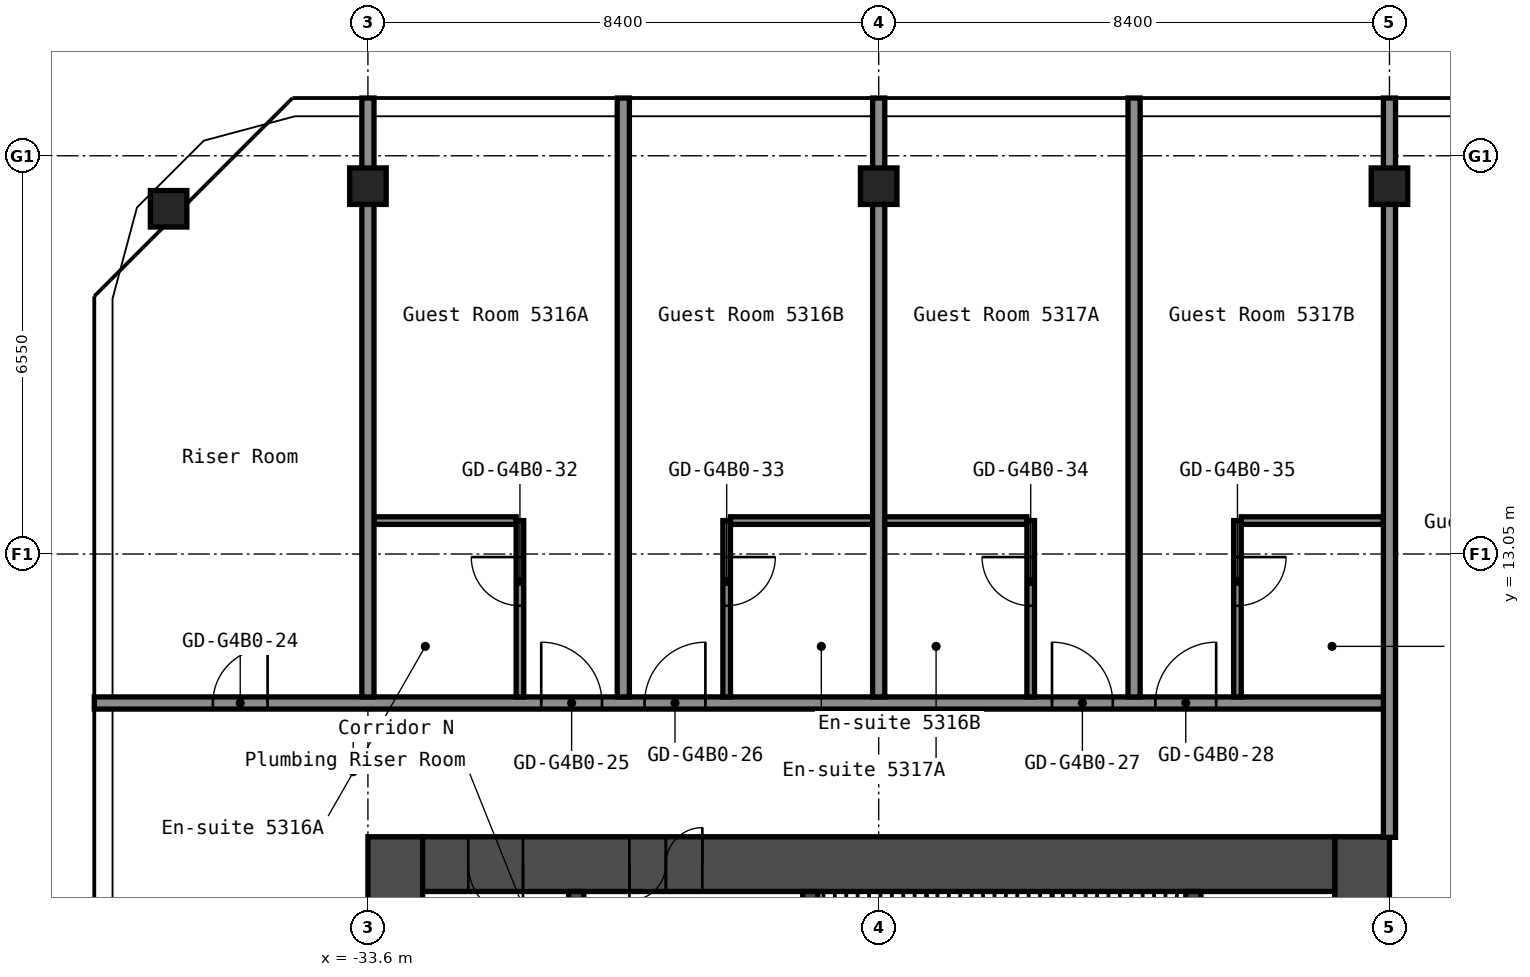
"""IFC4 building model, lengths in metres.
Left out: names, types, materials, properties, quantities, classifications, styles, units other than length and angle.
Written with IfcOpenShell. Run it as: python <this file> out.ifc"""

import sys

from ifc_helpers import new_model, si_unit, direction, frame, frame_2d, origin, origin_2d, place, context, subcontext, project, spatial, rectangle, hollow_rectangle, extrude, element, fill, save


model = new_model("IFC4")
c1 = context("Model", 3, precision=1e-05, world=origin(), true_north=direction((0.0, 1.0)))
c2 = subcontext(c1, "Body", "Model", "MODEL_VIEW")
j1 = project(units=[si_unit("LENGTHUNIT", "METRE"), si_unit("PLANEANGLEUNIT", "RADIAN")], contexts=[c1])
p1 = place(None, origin())
s1 = spatial("IfcSite", under=j1, at=p1, CompositionType="ELEMENT")
p2 = place(p1, origin())
s2 = spatial("IfcBuilding", under=s1, at=p2, CompositionType="ELEMENT")
p3 = place(p2, frame((0.0, 0.0, 189.8)))
s3 = spatial("IfcBuildingStorey", under=s2, at=p3, CompositionType="ELEMENT", Elevation=189.8)
for number, where, z_axis, x_axis in (
    (1, (-36.878, 18.729, 0.0), (0.0, 0.0, 1.0), (1.0, 0.0, 0.0)),
    (2, (-33.6, 19.1, 0.0), (0.0, 0.0, 1.0), (1.0, 0.0, 0.0)),
    (3, (-25.2, 19.1, 0.0), (0.0, 0.0, 1.0), (1.0, 0.0, 0.0)),
    (4, (-16.8, 19.1, 0.0), (0.0, 0.0, 1.0), (1.0, 0.0, 0.0)),
):
    element("IfcColumn", number, at=place(p3, frame(where, z_axis=z_axis, x_axis=x_axis)), inside=s3, PredefinedType="COLUMN", context=c2, shape_type="SweptSolid", body=[
        extrude(hollow_rectangle(XDim=0.6, YDim=0.6, WallThickness=0.025, InnerFilletRadius=0.038, OuterFilletRadius=0.062, at=origin_2d()), origin(), (0.0, 0.0, 1.0), 2.75),
    ])
p4 = place(p3, frame((-17.25, -8.4, 0.0), z_axis=(0.0, 0.0, 1.0), x_axis=(0.0, 1.0, 0.0)))
e5 = element("IfcWall", 5, at=p4, inside=s3, PredefinedType="SHEAR", context=c2, shape_type="SweptSolid", body=[
    extrude(rectangle(XDim=16.8, YDim=0.9, at=frame_2d((8.4, 0.0))), origin(), (0.0, 0.0, 1.0), 2.75),
])
p5 = place(p4, frame((10.1, 0.0, 0.0)))
e6 = element("IfcOpeningElement", 6, at=p5, cuts=e5, PredefinedType="OPENING", context=c2, shape_type="SweptSolid", body=[
    extrude(rectangle(XDim=1.6, YDim=2.1, at=frame_2d((0.8, 1.05))), frame((0.0, 0.46, 0.0), z_axis=(0.0, -1.0, 0.0), x_axis=(1.0, 0.0, 0.0)), (0.0, 0.0, 1.0), 0.92),
])
p6 = place(p3, frame((-33.15, -8.4, 0.0), z_axis=(0.0, 0.0, 1.0), x_axis=(0.0, 1.0, 0.0)))
e7 = element("IfcWall", 7, at=p6, inside=s3, PredefinedType="SHEAR", context=c2, shape_type="SweptSolid", body=[
    extrude(rectangle(XDim=16.8, YDim=0.9, at=frame_2d((8.4, 0.0))), origin(), (0.0, 0.0, 1.0), 2.75),
])
p7 = place(p3, frame((-32.7, 7.95, 0.0), z_axis=(0.0, 0.0, 1.0), x_axis=(1.0, 0.0, 0.0)))
e8 = element("IfcWall", 8, at=p7, inside=s3, PredefinedType="SHEAR", context=c2, shape_type="SweptSolid", body=[
    extrude(rectangle(XDim=15.0, YDim=0.9, at=frame_2d((7.5, 0.0))), origin(), (0.0, 0.0, 1.0), 2.75),
])
p8 = place(p7, frame((3.4, 0.0, 0.0)))
e9 = element("IfcOpeningElement", 9, at=p8, cuts=e8, PredefinedType="OPENING", context=c2, shape_type="SweptSolid", body=[
    extrude(rectangle(XDim=1.2, YDim=2.1, at=frame_2d((0.6, 1.05))), frame((0.0, 0.46, 0.0), z_axis=(0.0, -1.0, 0.0), x_axis=(1.0, 0.0, 0.0)), (0.0, 0.0, 1.0), 0.92),
])
p9 = place(p7, frame((0.75, 0.0, 0.0)))
e10 = element("IfcOpeningElement", 10, at=p9, cuts=e8, PredefinedType="OPENING", context=c2, shape_type="SweptSolid", body=[
    extrude(rectangle(XDim=0.9, YDim=2.1, at=frame_2d((0.45, 1.05))), frame((0.0, 0.46, 0.0), z_axis=(0.0, -1.0, 0.0), x_axis=(1.0, 0.0, 0.0)), (0.0, 0.0, 1.0), 0.92),
])
p10 = place(p3, frame((-20.025, 1.2, 0.0), z_axis=(0.0, 0.0, 1.0), x_axis=(0.0, 1.0, 0.0)))
e11 = element("IfcWall", 11, at=p10, inside=s3, PredefinedType="SHEAR", context=c2, shape_type="SweptSolid", body=[
    extrude(rectangle(XDim=6.3, YDim=0.25, at=frame_2d((3.15, 0.0))), origin(), (0.0, 0.0, 1.0), 2.75),
])
p11 = place(p3, frame((-26.325, 3.75, 0.0), z_axis=(0.0, 0.0, 1.0), x_axis=(0.0, 1.0, 0.0)))
e12 = element("IfcWall", 12, at=p11, inside=s3, PredefinedType="SHEAR", context=c2, shape_type="SweptSolid", body=[
    extrude(rectangle(XDim=3.75, YDim=0.25, at=frame_2d((1.875, 0.0))), origin(), (0.0, 0.0, 1.0), 2.75),
])
p12 = place(p11, frame((1.25, 0.0, 0.0)))
e13 = element("IfcOpeningElement", 13, at=p12, cuts=e12, PredefinedType="OPENING", context=c2, shape_type="SweptSolid", body=[
    extrude(rectangle(XDim=1.2, YDim=2.1, at=frame_2d((0.6, 1.05))), frame((0.0, 0.135, 0.0), z_axis=(0.0, -1.0, 0.0), x_axis=(1.0, 0.0, 0.0)), (0.0, 0.0, 1.0), 0.27),
])
p13 = place(p3, frame((-30.175, 1.45, 0.0), z_axis=(0.0, 0.0, 1.0), x_axis=(0.0, 1.0, 0.0)))
e14 = element("IfcWall", 14, at=p13, inside=s3, PredefinedType="SHEAR", context=c2, shape_type="SweptSolid", body=[
    extrude(rectangle(XDim=6.05, YDim=0.25, at=frame_2d((3.025, 0.0))), origin(), (0.0, 0.0, 1.0), 2.75),
])
p14 = place(p13, frame((2.625, 0.0, 0.0)))
e15 = element("IfcOpeningElement", 15, at=p14, cuts=e14, PredefinedType="OPENING", context=c2, shape_type="SweptSolid", body=[
    extrude(rectangle(XDim=1.1, YDim=2.1, at=frame_2d((0.55, 1.05))), frame((0.0, 0.135, 0.0), z_axis=(0.0, -1.0, 0.0), x_axis=(1.0, 0.0, 0.0)), (0.0, 0.0, 1.0), 0.27),
])
p15 = place(p3, frame((-38.1, 10.6, 0.0), z_axis=(0.0, 0.0, 1.0), x_axis=(1.0, 0.0, 0.0)))
e16 = element("IfcWall", 16, at=p15, inside=s3, PredefinedType="PARTITIONING", context=c2, shape_type="SweptSolid", body=[
    extrude(rectangle(XDim=21.3, YDim=0.2, at=frame_2d((10.65, 0.0))), origin(), (0.0, 0.0, 1.0), 2.75),
])
p16 = place(p15, frame((1.95, 0.0, 0.0)))
e17 = element("IfcOpeningElement", 17, at=p16, cuts=e16, PredefinedType="OPENING", context=c2, shape_type="SweptSolid", body=[
    extrude(rectangle(XDim=0.9, YDim=2.1, at=frame_2d((0.45, 1.05))), frame((0.0, 0.11, 0.0), z_axis=(0.0, -1.0, 0.0), x_axis=(1.0, 0.0, 0.0)), (0.0, 0.0, 1.0), 0.22),
])
p17 = place(p15, frame((7.35, 0.0, 0.0)))
e18 = element("IfcOpeningElement", 18, at=p17, cuts=e16, PredefinedType="OPENING", context=c2, shape_type="SweptSolid", body=[
    extrude(rectangle(XDim=1.0, YDim=2.1, at=frame_2d((0.5, 1.05))), frame((0.0, 0.11, 0.0), z_axis=(0.0, -1.0, 0.0), x_axis=(1.0, 0.0, 0.0)), (0.0, 0.0, 1.0), 0.22),
])
p18 = place(p15, frame((9.05, 0.0, 0.0)))
e19 = element("IfcOpeningElement", 19, at=p18, cuts=e16, PredefinedType="OPENING", context=c2, shape_type="SweptSolid", body=[
    extrude(rectangle(XDim=1.0, YDim=2.1, at=frame_2d((0.5, 1.05))), frame((0.0, 0.11, 0.0), z_axis=(0.0, -1.0, 0.0), x_axis=(1.0, 0.0, 0.0)), (0.0, 0.0, 1.0), 0.22),
])
p19 = place(p15, frame((15.75, 0.0, 0.0)))
e20 = element("IfcOpeningElement", 20, at=p19, cuts=e16, PredefinedType="OPENING", context=c2, shape_type="SweptSolid", body=[
    extrude(rectangle(XDim=1.0, YDim=2.1, at=frame_2d((0.5, 1.05))), frame((0.0, 0.11, 0.0), z_axis=(0.0, -1.0, 0.0), x_axis=(1.0, 0.0, 0.0)), (0.0, 0.0, 1.0), 0.22),
])
p20 = place(p15, frame((17.45, 0.0, 0.0)))
e21 = element("IfcOpeningElement", 21, at=p20, cuts=e16, PredefinedType="OPENING", context=c2, shape_type="SweptSolid", body=[
    extrude(rectangle(XDim=1.0, YDim=2.1, at=frame_2d((0.5, 1.05))), frame((0.0, 0.11, 0.0), z_axis=(0.0, -1.0, 0.0), x_axis=(1.0, 0.0, 0.0)), (0.0, 0.0, 1.0), 0.22),
])
p21 = place(p3, frame((-33.5, 13.6, 0.0), z_axis=(0.0, 0.0, 1.0), x_axis=(1.0, 0.0, 0.0)))
e22 = element("IfcWall", 22, at=p21, inside=s3, PredefinedType="PARTITIONING", context=c2, shape_type="SweptSolid", body=[
    extrude(rectangle(XDim=2.337, YDim=0.125, at=frame_2d((1.169, 0.0))), origin(), (0.0, 0.0, 1.0), 2.75),
])
p22 = place(p3, frame((-27.637, 13.6, 0.0), z_axis=(0.0, 0.0, 1.0), x_axis=(1.0, 0.0, 0.0)))
e23 = element("IfcWall", 23, at=p22, inside=s3, PredefinedType="PARTITIONING", context=c2, shape_type="SweptSolid", body=[
    extrude(rectangle(XDim=4.875, YDim=0.125, at=frame_2d((2.438, 0.0))), origin(), (0.0, 0.0, 1.0), 2.75),
])
p23 = place(p3, frame((-19.238, 13.6, 0.0), z_axis=(0.0, 0.0, 1.0), x_axis=(1.0, 0.0, 0.0)))
e24 = element("IfcWall", 24, at=p23, inside=s3, PredefinedType="PARTITIONING", context=c2, shape_type="SweptSolid", body=[
    extrude(rectangle(XDim=2.338, YDim=0.125, at=frame_2d((1.169, 0.0))), origin(), (0.0, 0.0, 1.0), 2.75),
])
p24 = place(p3, frame((-33.6, 10.7, 0.0), z_axis=(0.0, 0.0, 1.0), x_axis=(0.0, 1.0, 0.0)))
e25 = element("IfcWall", 25, at=p24, inside=s3, PredefinedType="PARTITIONING", context=c2, shape_type="SweptSolid", body=[
    extrude(rectangle(XDim=9.85, YDim=0.2, at=frame_2d((4.925, 0.0))), origin(), (0.0, 0.0, 1.0), 2.75),
])
p25 = place(p3, frame((-31.1, 10.7, 0.0), z_axis=(0.0, 0.0, 1.0), x_axis=(0.0, 1.0, 0.0)))
e26 = element("IfcWall", 26, at=p25, inside=s3, PredefinedType="PARTITIONING", context=c2, shape_type="SweptSolid", body=[
    extrude(rectangle(XDim=2.9, YDim=0.125, at=frame_2d((1.45, 0.0))), origin(), (0.0, 0.0, 1.0), 2.75),
])
p26 = place(p25, frame((1.5, 0.0, 0.0)))
e27 = element("IfcOpeningElement", 27, at=p26, cuts=e26, PredefinedType="OPENING", context=c2, shape_type="SweptSolid", body=[
    extrude(rectangle(XDim=0.8, YDim=2.1, at=frame_2d((0.4, 1.05))), frame((0.0, 0.073, 0.0), z_axis=(0.0, -1.0, 0.0), x_axis=(1.0, 0.0, 0.0)), (0.0, 0.0, 1.0), 0.145),
])
p27 = place(p3, frame((-29.4, 10.7, 0.0), z_axis=(0.0, 0.0, 1.0), x_axis=(0.0, 1.0, 0.0)))
e28 = element("IfcWall", 28, at=p27, inside=s3, PredefinedType="PARTITIONING", context=c2, shape_type="SweptSolid", body=[
    extrude(rectangle(XDim=9.85, YDim=0.2, at=frame_2d((4.925, 0.0))), origin(), (0.0, 0.0, 1.0), 2.75),
])
p28 = place(p3, frame((-27.7, 10.7, 0.0), z_axis=(0.0, 0.0, 1.0), x_axis=(0.0, 1.0, 0.0)))
e29 = element("IfcWall", 29, at=p28, inside=s3, PredefinedType="PARTITIONING", context=c2, shape_type="SweptSolid", body=[
    extrude(rectangle(XDim=2.9, YDim=0.125, at=frame_2d((1.45, 0.0))), origin(), (0.0, 0.0, 1.0), 2.75),
])
p29 = place(p28, frame((1.5, 0.0, 0.0)))
e30 = element("IfcOpeningElement", 30, at=p29, cuts=e29, PredefinedType="OPENING", context=c2, shape_type="SweptSolid", body=[
    extrude(rectangle(XDim=0.8, YDim=2.1, at=frame_2d((0.4, 1.05))), frame((0.0, 0.073, 0.0), z_axis=(0.0, -1.0, 0.0), x_axis=(1.0, 0.0, 0.0)), (0.0, 0.0, 1.0), 0.145),
])
p30 = place(p3, frame((-25.2, 10.7, 0.0), z_axis=(0.0, 0.0, 1.0), x_axis=(0.0, 1.0, 0.0)))
e31 = element("IfcWall", 31, at=p30, inside=s3, PredefinedType="PARTITIONING", context=c2, shape_type="SweptSolid", body=[
    extrude(rectangle(XDim=9.85, YDim=0.2, at=frame_2d((4.925, 0.0))), origin(), (0.0, 0.0, 1.0), 2.75),
])
p31 = place(p3, frame((-22.7, 10.7, 0.0), z_axis=(0.0, 0.0, 1.0), x_axis=(0.0, 1.0, 0.0)))
e32 = element("IfcWall", 32, at=p31, inside=s3, PredefinedType="PARTITIONING", context=c2, shape_type="SweptSolid", body=[
    extrude(rectangle(XDim=2.9, YDim=0.125, at=frame_2d((1.45, 0.0))), origin(), (0.0, 0.0, 1.0), 2.75),
])
p32 = place(p31, frame((1.5, 0.0, 0.0)))
e33 = element("IfcOpeningElement", 33, at=p32, cuts=e32, PredefinedType="OPENING", context=c2, shape_type="SweptSolid", body=[
    extrude(rectangle(XDim=0.8, YDim=2.1, at=frame_2d((0.4, 1.05))), frame((0.0, 0.073, 0.0), z_axis=(0.0, -1.0, 0.0), x_axis=(1.0, 0.0, 0.0)), (0.0, 0.0, 1.0), 0.145),
])
p33 = place(p3, frame((-21.0, 10.7, 0.0), z_axis=(0.0, 0.0, 1.0), x_axis=(0.0, 1.0, 0.0)))
e34 = element("IfcWall", 34, at=p33, inside=s3, PredefinedType="PARTITIONING", context=c2, shape_type="SweptSolid", body=[
    extrude(rectangle(XDim=9.85, YDim=0.2, at=frame_2d((4.925, 0.0))), origin(), (0.0, 0.0, 1.0), 2.75),
])
p34 = place(p3, frame((-19.3, 10.7, 0.0), z_axis=(0.0, 0.0, 1.0), x_axis=(0.0, 1.0, 0.0)))
e35 = element("IfcWall", 35, at=p34, inside=s3, PredefinedType="PARTITIONING", context=c2, shape_type="SweptSolid", body=[
    extrude(rectangle(XDim=2.9, YDim=0.125, at=frame_2d((1.45, 0.0))), origin(), (0.0, 0.0, 1.0), 2.75),
])
p35 = place(p34, frame((1.5, 0.0, 0.0)))
e36 = element("IfcOpeningElement", 36, at=p35, cuts=e35, PredefinedType="OPENING", context=c2, shape_type="SweptSolid", body=[
    extrude(rectangle(XDim=0.8, YDim=2.1, at=frame_2d((0.4, 1.05))), frame((0.0, 0.073, 0.0), z_axis=(0.0, -1.0, 0.0), x_axis=(1.0, 0.0, 0.0)), (0.0, 0.0, 1.0), 0.145),
])
p36 = place(p3, frame((-16.8, 8.39, 0.0), z_axis=(0.0, 0.0, 1.0), x_axis=(0.0, 1.0, 0.0)))
e37 = element("IfcWall", 37, at=p36, inside=s3, PredefinedType="PARTITIONING", context=c2, shape_type="SweptSolid", body=[
    extrude(rectangle(XDim=12.16, YDim=0.2, at=frame_2d((6.08, 0.0))), origin(), (0.0, 0.0, 1.0), 2.75),
])
p37 = place(p8, origin())
e38 = element("IfcDoor", 38, at=p37, inside=s3, OperationType="DOUBLE_DOOR_SINGLE_SWING", PredefinedType="DOOR", context=c2, shape_type="SweptSolid", body=[
    extrude(rectangle(XDim=1.2, YDim=2.1, at=frame_2d((0.6, 1.05))), frame((0.0, 0.025, 0.0), z_axis=(0.0, -1.0, 0.0), x_axis=(1.0, 0.0, 0.0)), (0.0, 0.0, 1.0), 0.05),
])
fill(e9, e38)
p38 = place(p9, origin())
e39 = element("IfcDoor", 39, at=p38, inside=s3, OperationType="SINGLE_SWING_RIGHT", PredefinedType="DOOR", context=c2, shape_type="SweptSolid", body=[
    extrude(rectangle(XDim=0.9, YDim=2.1, at=frame_2d((0.45, 1.05))), frame((0.0, 0.025, 0.0), z_axis=(0.0, -1.0, 0.0), x_axis=(1.0, 0.0, 0.0)), (0.0, 0.0, 1.0), 0.05),
])
fill(e10, e39)
p39 = place(p16, origin())
e40 = element("IfcDoor", 40, at=p39, inside=s3, OperationType="SINGLE_SWING_LEFT", PredefinedType="DOOR", context=c2, shape_type="SweptSolid", body=[
    extrude(rectangle(XDim=0.9, YDim=2.1, at=frame_2d((0.45, 1.05))), frame((0.0, 0.025, 0.0), z_axis=(0.0, -1.0, 0.0), x_axis=(1.0, 0.0, 0.0)), (0.0, 0.0, 1.0), 0.05),
])
fill(e17, e40)
p40 = place(p17, origin())
e41 = element("IfcDoor", 41, at=p40, inside=s3, OperationType="SINGLE_SWING_RIGHT", PredefinedType="DOOR", context=c2, shape_type="SweptSolid", body=[
    extrude(rectangle(XDim=1.0, YDim=2.1, at=frame_2d((0.5, 1.05))), frame((0.0, 0.025, 0.0), z_axis=(0.0, -1.0, 0.0), x_axis=(1.0, 0.0, 0.0)), (0.0, 0.0, 1.0), 0.05),
])
fill(e18, e41)
p41 = place(p18, origin())
e42 = element("IfcDoor", 42, at=p41, inside=s3, OperationType="SINGLE_SWING_LEFT", PredefinedType="DOOR", context=c2, shape_type="SweptSolid", body=[
    extrude(rectangle(XDim=1.0, YDim=2.1, at=frame_2d((0.5, 1.05))), frame((0.0, 0.025, 0.0), z_axis=(0.0, -1.0, 0.0), x_axis=(1.0, 0.0, 0.0)), (0.0, 0.0, 1.0), 0.05),
])
fill(e19, e42)
p42 = place(p19, origin())
e43 = element("IfcDoor", 43, at=p42, inside=s3, OperationType="SINGLE_SWING_RIGHT", PredefinedType="DOOR", context=c2, shape_type="SweptSolid", body=[
    extrude(rectangle(XDim=1.0, YDim=2.1, at=frame_2d((0.5, 1.05))), frame((0.0, 0.025, 0.0), z_axis=(0.0, -1.0, 0.0), x_axis=(1.0, 0.0, 0.0)), (0.0, 0.0, 1.0), 0.05),
])
fill(e20, e43)
p43 = place(p20, origin())
e44 = element("IfcDoor", 44, at=p43, inside=s3, OperationType="SINGLE_SWING_LEFT", PredefinedType="DOOR", context=c2, shape_type="SweptSolid", body=[
    extrude(rectangle(XDim=1.0, YDim=2.1, at=frame_2d((0.5, 1.05))), frame((0.0, 0.025, 0.0), z_axis=(0.0, -1.0, 0.0), x_axis=(1.0, 0.0, 0.0)), (0.0, 0.0, 1.0), 0.05),
])
fill(e21, e44)
p44 = place(p26, origin())
e45 = element("IfcDoor", 45, at=p44, inside=s3, OperationType="SINGLE_SWING_LEFT", PredefinedType="DOOR", context=c2, shape_type="SweptSolid", body=[
    extrude(rectangle(XDim=0.8, YDim=2.1, at=frame_2d((0.4, 1.05))), frame((0.0, 0.025, 0.0), z_axis=(0.0, -1.0, 0.0), x_axis=(1.0, 0.0, 0.0)), (0.0, 0.0, 1.0), 0.05),
])
fill(e27, e45)
p45 = place(p29, origin())
e46 = element("IfcDoor", 46, at=p45, inside=s3, OperationType="SINGLE_SWING_RIGHT", PredefinedType="DOOR", context=c2, shape_type="SweptSolid", body=[
    extrude(rectangle(XDim=0.8, YDim=2.1, at=frame_2d((0.4, 1.05))), frame((0.0, 0.025, 0.0), z_axis=(0.0, -1.0, 0.0), x_axis=(1.0, 0.0, 0.0)), (0.0, 0.0, 1.0), 0.05),
])
fill(e30, e46)
p46 = place(p32, origin())
e47 = element("IfcDoor", 47, at=p46, inside=s3, OperationType="SINGLE_SWING_LEFT", PredefinedType="DOOR", context=c2, shape_type="SweptSolid", body=[
    extrude(rectangle(XDim=0.8, YDim=2.1, at=frame_2d((0.4, 1.05))), frame((0.0, 0.025, 0.0), z_axis=(0.0, -1.0, 0.0), x_axis=(1.0, 0.0, 0.0)), (0.0, 0.0, 1.0), 0.05),
])
fill(e33, e47)
p47 = place(p35, origin())
e48 = element("IfcDoor", 48, at=p47, inside=s3, OperationType="SINGLE_SWING_RIGHT", PredefinedType="DOOR", context=c2, shape_type="SweptSolid", body=[
    extrude(rectangle(XDim=0.8, YDim=2.1, at=frame_2d((0.4, 1.05))), frame((0.0, 0.025, 0.0), z_axis=(0.0, -1.0, 0.0), x_axis=(1.0, 0.0, 0.0)), (0.0, 0.0, 1.0), 0.05),
])
fill(e36, e48)
save(model, sys.argv[1])
